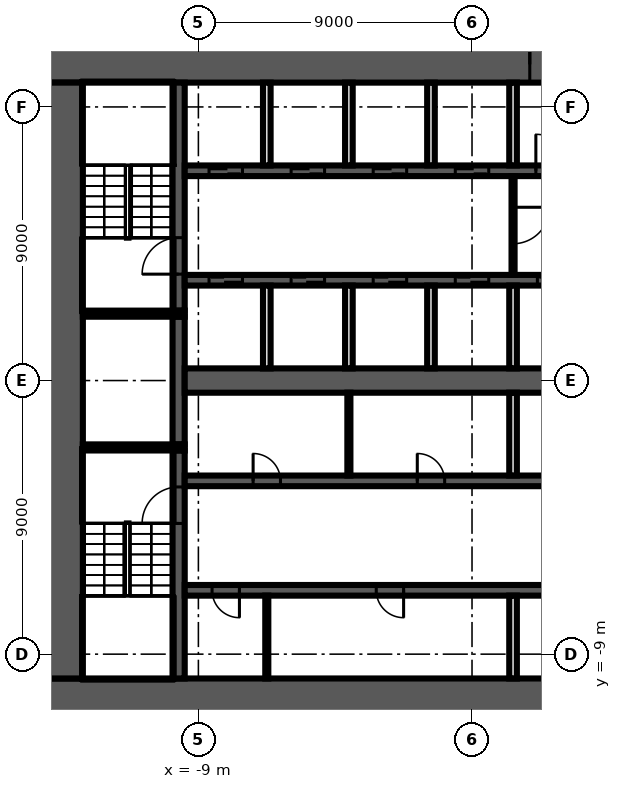
"""IFC4 building model, lengths in metres.
Left out: names, types, materials, properties, quantities, classifications, styles, units other than length and angle.
Written with IfcOpenShell. Run it as: python <this file> out.ifc"""

import sys

from ifc_helpers import new_model, si_unit, direction, frame, frame_2d, origin, place, context, subcontext, project, spatial, rectangle, extrude, element, fill, save


model = new_model("IFC4")
c1 = context("Model", 3, precision=1e-05, world=origin(), true_north=direction((0.0, 1.0)))
c2 = subcontext(c1, "Body", "Model", "MODEL_VIEW")
j1 = project(units=[si_unit("LENGTHUNIT", "METRE"), si_unit("PLANEANGLEUNIT", "RADIAN")], contexts=[c1])
p1 = place(None, origin())
s1 = spatial("IfcSite", under=j1, at=p1, CompositionType="ELEMENT")
p2 = place(p1, origin())
s2 = spatial("IfcBuilding", under=s1, at=p2, CompositionType="ELEMENT")
p3 = place(p2, frame((0.0, 0.0, 19.0)))
s3 = spatial("IfcBuildingStorey", under=s2, at=p3, CompositionType="ELEMENT", Elevation=19.0)
p4 = place(p3, frame((-14.0, 10.4, 0.0), z_axis=(0.0, 0.0, 1.0), x_axis=(1.0, 0.0, 0.0)))
e1 = element("IfcWall", 1, at=p4, inside=s3, PredefinedType="SHEAR", context=c2, shape_type="SweptSolid", body=[
    extrude(rectangle(XDim=28.0, YDim=1.2, at=frame_2d((14.0, 0.0))), origin(), (0.0, 0.0, 1.0), 7.55),
])
p5 = place(p4, frame((15.9, 0.0, 0.0)))
e2 = element("IfcOpeningElement", 2, at=p5, cuts=e1, PredefinedType="OPENING", context=c2, shape_type="SweptSolid", body=[
    extrude(rectangle(XDim=1.6, YDim=2.1, at=frame_2d((0.8, 1.05))), frame((0.0, 0.61, 0.0), z_axis=(0.0, -1.0, 0.0), x_axis=(1.0, 0.0, 0.0)), (0.0, 0.0, 1.0), 1.22),
])
p6 = place(p3, frame((14.0, -10.4, 0.0), z_axis=(0.0, 0.0, 1.0), x_axis=(-1.0, 0.0, 0.0)))
e3 = element("IfcWall", 3, at=p6, inside=s3, PredefinedType="SHEAR", context=c2, shape_type="SweptSolid", body=[
    extrude(rectangle(XDim=28.0, YDim=1.2, at=frame_2d((14.0, 0.0))), origin(), (0.0, 0.0, 1.0), 7.55),
])
p7 = place(p6, frame((5.1, 0.0, 0.0)))
e4 = element("IfcOpeningElement", 4, at=p7, cuts=e3, PredefinedType="OPENING", context=c2, shape_type="SweptSolid", body=[
    extrude(rectangle(XDim=1.6, YDim=2.1, at=frame_2d((0.8, 1.05))), frame((0.0, 0.61, 0.0), z_axis=(0.0, -1.0, 0.0), x_axis=(1.0, 0.0, 0.0)), (0.0, 0.0, 1.0), 1.22),
])
p8 = place(p3, frame((-13.4, -9.8, 0.0), z_axis=(0.0, 0.0, 1.0), x_axis=(0.0, 1.0, 0.0)))
e5 = element("IfcWall", 5, at=p8, inside=s3, PredefinedType="SHEAR", context=c2, shape_type="SweptSolid", body=[
    extrude(rectangle(XDim=19.6, YDim=1.2, at=frame_2d((9.8, 0.0))), origin(), (0.0, 0.0, 1.0), 7.55),
])
p9 = place(p3, frame((-9.65, -9.8, 0.0), z_axis=(0.0, 0.0, 1.0), x_axis=(0.0, 1.0, 0.0)))
e6 = element("IfcWall", 6, at=p9, inside=s3, PredefinedType="SHEAR", context=c2, shape_type="SweptSolid", body=[
    extrude(rectangle(XDim=7.5, YDim=0.4, at=frame_2d((3.75, 0.0))), origin(), (0.0, 0.0, 1.0), 7.55),
])
p10 = place(p9, frame((5.1, 0.0, 0.0)))
e7 = element("IfcOpeningElement", 7, at=p10, cuts=e6, PredefinedType="OPENING", context=c2, shape_type="SweptSolid", body=[
    extrude(rectangle(XDim=1.2, YDim=2.1, at=frame_2d((0.6, 1.05))), frame((0.0, 0.21, 0.0), z_axis=(0.0, -1.0, 0.0), x_axis=(1.0, 0.0, 0.0)), (0.0, 0.0, 1.0), 0.42),
])
p11 = place(p3, frame((-9.65, -2.1, 0.0), z_axis=(0.0, 0.0, 1.0), x_axis=(0.0, 1.0, 0.0)))
e8 = element("IfcWall", 8, at=p11, inside=s3, PredefinedType="SHEAR", context=c2, shape_type="SweptSolid", body=[
    extrude(rectangle(XDim=4.2, YDim=0.4, at=frame_2d((2.1, 0.0))), origin(), (0.0, 0.0, 1.0), 7.55),
])
p12 = place(p3, frame((-9.65, 2.3, 0.0), z_axis=(0.0, 0.0, 1.0), x_axis=(0.0, 1.0, 0.0)))
e9 = element("IfcWall", 9, at=p12, inside=s3, PredefinedType="SHEAR", context=c2, shape_type="SweptSolid", body=[
    extrude(rectangle(XDim=7.5, YDim=0.4, at=frame_2d((3.75, 0.0))), origin(), (0.0, 0.0, 1.0), 7.55),
])
p13 = place(p12, frame((1.2, 0.0, 0.0)))
e10 = element("IfcOpeningElement", 10, at=p13, cuts=e9, PredefinedType="OPENING", context=c2, shape_type="SweptSolid", body=[
    extrude(rectangle(XDim=1.2, YDim=2.1, at=frame_2d((0.6, 1.05))), frame((0.0, 0.21, 0.0), z_axis=(0.0, -1.0, 0.0), x_axis=(1.0, 0.0, 0.0)), (0.0, 0.0, 1.0), 0.42),
])
for number, where, z_axis, x_axis in (
    (11, (-9.45, 2.2, 0.0), (0.0, 0.0, 1.0), (-1.0, 0.0, 0.0)),
    (12, (-9.45, -2.2, 0.0), (0.0, 0.0, 1.0), (-1.0, 0.0, 0.0)),
):
    element("IfcWall", number, at=place(p3, frame(where, z_axis=z_axis, x_axis=x_axis)), inside=s3, PredefinedType="SHEAR", context=c2, shape_type="SweptSolid", body=[
        extrude(rectangle(XDim=3.35, YDim=0.2, at=frame_2d((1.675, 0.0))), origin(), (0.0, 0.0, 1.0), 7.55),
    ])
p14 = place(p3, frame((-9.45, 6.9, 0.0), z_axis=(0.0, 0.0, 1.0), x_axis=(1.0, 0.0, 0.0)))
e13 = element("IfcWall", 13, at=p14, inside=s3, PredefinedType="SHEAR", context=c2, shape_type="SweptSolid", body=[
    extrude(rectangle(XDim=18.9, YDim=0.35, at=frame_2d((9.45, 0.0))), origin(), (0.0, 0.0, 1.0), 7.55),
])
p15 = place(p14, frame((0.8, 0.0, 0.0)))
e14 = element("IfcOpeningElement", 14, at=p15, cuts=e13, PredefinedType="OPENING", context=c2, shape_type="SweptSolid", body=[
    extrude(rectangle(XDim=1.1, YDim=2.1, at=frame_2d((0.55, 1.05))), frame((0.0, 0.185, 0.0), z_axis=(0.0, -1.0, 0.0), x_axis=(1.0, 0.0, 0.0)), (0.0, 0.0, 1.0), 0.37),
])
p16 = place(p14, frame((3.5, 0.0, 0.0)))
e15 = element("IfcOpeningElement", 15, at=p16, cuts=e13, PredefinedType="OPENING", context=c2, shape_type="SweptSolid", body=[
    extrude(rectangle(XDim=1.1, YDim=2.1, at=frame_2d((0.55, 1.05))), frame((0.0, 0.185, 0.0), z_axis=(0.0, -1.0, 0.0), x_axis=(1.0, 0.0, 0.0)), (0.0, 0.0, 1.0), 0.37),
])
p17 = place(p14, frame((6.2, 0.0, 0.0)))
e16 = element("IfcOpeningElement", 16, at=p17, cuts=e13, PredefinedType="OPENING", context=c2, shape_type="SweptSolid", body=[
    extrude(rectangle(XDim=1.1, YDim=2.1, at=frame_2d((0.55, 1.05))), frame((0.0, 0.185, 0.0), z_axis=(0.0, -1.0, 0.0), x_axis=(1.0, 0.0, 0.0)), (0.0, 0.0, 1.0), 0.37),
])
p18 = place(p14, frame((8.9, 0.0, 0.0)))
e17 = element("IfcOpeningElement", 17, at=p18, cuts=e13, PredefinedType="OPENING", context=c2, shape_type="SweptSolid", body=[
    extrude(rectangle(XDim=1.1, YDim=2.1, at=frame_2d((0.55, 1.05))), frame((0.0, 0.185, 0.0), z_axis=(0.0, -1.0, 0.0), x_axis=(1.0, 0.0, 0.0)), (0.0, 0.0, 1.0), 0.37),
])
p19 = place(p14, frame((11.55, 0.0, 0.0)))
e18 = element("IfcOpeningElement", 18, at=p19, cuts=e13, PredefinedType="OPENING", context=c2, shape_type="SweptSolid", body=[
    extrude(rectangle(XDim=1.2, YDim=2.1, at=frame_2d((0.6, 1.05))), frame((0.0, 0.185, 0.0), z_axis=(0.0, -1.0, 0.0), x_axis=(1.0, 0.0, 0.0)), (0.0, 0.0, 1.0), 0.37),
])
p20 = place(p14, frame((14.3, 0.0, 0.0)))
e19 = element("IfcOpeningElement", 19, at=p20, cuts=e13, PredefinedType="OPENING", context=c2, shape_type="SweptSolid", body=[
    extrude(rectangle(XDim=1.1, YDim=2.1, at=frame_2d((0.55, 1.05))), frame((0.0, 0.185, 0.0), z_axis=(0.0, -1.0, 0.0), x_axis=(1.0, 0.0, 0.0)), (0.0, 0.0, 1.0), 0.37),
])
p21 = place(p14, frame((17.0, 0.0, 0.0)))
e20 = element("IfcOpeningElement", 20, at=p21, cuts=e13, PredefinedType="OPENING", context=c2, shape_type="SweptSolid", body=[
    extrude(rectangle(XDim=1.1, YDim=2.1, at=frame_2d((0.55, 1.05))), frame((0.0, 0.185, 0.0), z_axis=(0.0, -1.0, 0.0), x_axis=(1.0, 0.0, 0.0)), (0.0, 0.0, 1.0), 0.37),
])
p22 = place(p3, frame((9.45, 3.3, 0.0), z_axis=(0.0, 0.0, 1.0), x_axis=(-1.0, 0.0, 0.0)))
e21 = element("IfcWall", 21, at=p22, inside=s3, PredefinedType="SHEAR", context=c2, shape_type="SweptSolid", body=[
    extrude(rectangle(XDim=18.9, YDim=0.35, at=frame_2d((9.45, 0.0))), origin(), (0.0, 0.0, 1.0), 7.55),
])
p23 = place(p22, frame((17.0, 0.0, 0.0)))
e22 = element("IfcOpeningElement", 22, at=p23, cuts=e21, PredefinedType="OPENING", context=c2, shape_type="SweptSolid", body=[
    extrude(rectangle(XDim=1.1, YDim=2.1, at=frame_2d((0.55, 1.05))), frame((0.0, 0.185, 0.0), z_axis=(0.0, -1.0, 0.0), x_axis=(1.0, 0.0, 0.0)), (0.0, 0.0, 1.0), 0.37),
])
p24 = place(p22, frame((14.3, 0.0, 0.0)))
e23 = element("IfcOpeningElement", 23, at=p24, cuts=e21, PredefinedType="OPENING", context=c2, shape_type="SweptSolid", body=[
    extrude(rectangle(XDim=1.1, YDim=2.1, at=frame_2d((0.55, 1.05))), frame((0.0, 0.185, 0.0), z_axis=(0.0, -1.0, 0.0), x_axis=(1.0, 0.0, 0.0)), (0.0, 0.0, 1.0), 0.37),
])
p25 = place(p22, frame((11.6, 0.0, 0.0)))
e24 = element("IfcOpeningElement", 24, at=p25, cuts=e21, PredefinedType="OPENING", context=c2, shape_type="SweptSolid", body=[
    extrude(rectangle(XDim=1.1, YDim=2.1, at=frame_2d((0.55, 1.05))), frame((0.0, 0.185, 0.0), z_axis=(0.0, -1.0, 0.0), x_axis=(1.0, 0.0, 0.0)), (0.0, 0.0, 1.0), 0.37),
])
p26 = place(p22, frame((8.9, 0.0, 0.0)))
e25 = element("IfcOpeningElement", 25, at=p26, cuts=e21, PredefinedType="OPENING", context=c2, shape_type="SweptSolid", body=[
    extrude(rectangle(XDim=1.1, YDim=2.1, at=frame_2d((0.55, 1.05))), frame((0.0, 0.185, 0.0), z_axis=(0.0, -1.0, 0.0), x_axis=(1.0, 0.0, 0.0)), (0.0, 0.0, 1.0), 0.37),
])
p27 = place(p22, frame((6.2, 0.0, 0.0)))
e26 = element("IfcOpeningElement", 26, at=p27, cuts=e21, PredefinedType="OPENING", context=c2, shape_type="SweptSolid", body=[
    extrude(rectangle(XDim=1.1, YDim=2.1, at=frame_2d((0.55, 1.05))), frame((0.0, 0.185, 0.0), z_axis=(0.0, -1.0, 0.0), x_axis=(1.0, 0.0, 0.0)), (0.0, 0.0, 1.0), 0.37),
])
p28 = place(p22, frame((3.5, 0.0, 0.0)))
e27 = element("IfcOpeningElement", 27, at=p28, cuts=e21, PredefinedType="OPENING", context=c2, shape_type="SweptSolid", body=[
    extrude(rectangle(XDim=1.1, YDim=2.1, at=frame_2d((0.55, 1.05))), frame((0.0, 0.185, 0.0), z_axis=(0.0, -1.0, 0.0), x_axis=(1.0, 0.0, 0.0)), (0.0, 0.0, 1.0), 0.37),
])
p29 = place(p22, frame((0.9, 0.0, 0.0)))
e28 = element("IfcOpeningElement", 28, at=p29, cuts=e21, PredefinedType="OPENING", context=c2, shape_type="SweptSolid", body=[
    extrude(rectangle(XDim=0.9, YDim=2.1, at=frame_2d((0.45, 1.05))), frame((0.0, 0.185, 0.0), z_axis=(0.0, -1.0, 0.0), x_axis=(1.0, 0.0, 0.0)), (0.0, 0.0, 1.0), 0.37),
])
p30 = place(p3, frame((-9.45, -3.3, 0.0), z_axis=(0.0, 0.0, 1.0), x_axis=(1.0, 0.0, 0.0)))
e29 = element("IfcWall", 29, at=p30, inside=s3, PredefinedType="SHEAR", context=c2, shape_type="SweptSolid", body=[
    extrude(rectangle(XDim=18.9, YDim=0.35, at=frame_2d((9.45, 0.0))), origin(), (0.0, 0.0, 1.0), 7.55),
])
p31 = place(p30, frame((17.0, 0.0, 0.0)))
e30 = element("IfcOpeningElement", 30, at=p31, cuts=e29, PredefinedType="OPENING", context=c2, shape_type="SweptSolid", body=[
    extrude(rectangle(XDim=1.1, YDim=2.1, at=frame_2d((0.55, 1.05))), frame((0.0, 0.185, 0.0), z_axis=(0.0, -1.0, 0.0), x_axis=(1.0, 0.0, 0.0)), (0.0, 0.0, 1.0), 0.37),
])
p32 = place(p30, frame((2.25, 0.0, 0.0)))
e31 = element("IfcOpeningElement", 31, at=p32, cuts=e29, PredefinedType="OPENING", context=c2, shape_type="SweptSolid", body=[
    extrude(rectangle(XDim=0.9, YDim=2.1, at=frame_2d((0.45, 1.05))), frame((0.0, 0.185, 0.0), z_axis=(0.0, -1.0, 0.0), x_axis=(1.0, 0.0, 0.0)), (0.0, 0.0, 1.0), 0.37),
])
p33 = place(p30, frame((7.65, 0.0, 0.0)))
e32 = element("IfcOpeningElement", 32, at=p33, cuts=e29, PredefinedType="OPENING", context=c2, shape_type="SweptSolid", body=[
    extrude(rectangle(XDim=0.9, YDim=2.1, at=frame_2d((0.45, 1.05))), frame((0.0, 0.185, 0.0), z_axis=(0.0, -1.0, 0.0), x_axis=(1.0, 0.0, 0.0)), (0.0, 0.0, 1.0), 0.37),
])
p34 = place(p3, frame((9.45, -6.9, 0.0), z_axis=(0.0, 0.0, 1.0), x_axis=(-1.0, 0.0, 0.0)))
e33 = element("IfcWall", 33, at=p34, inside=s3, PredefinedType="SHEAR", context=c2, shape_type="SweptSolid", body=[
    extrude(rectangle(XDim=18.9, YDim=0.35, at=frame_2d((9.45, 0.0))), origin(), (0.0, 0.0, 1.0), 7.55),
])
p35 = place(p34, frame((0.75, 0.0, 0.0)))
e34 = element("IfcOpeningElement", 34, at=p35, cuts=e33, PredefinedType="OPENING", context=c2, shape_type="SweptSolid", body=[
    extrude(rectangle(XDim=1.2, YDim=2.1, at=frame_2d((0.6, 1.05))), frame((0.0, 0.185, 0.0), z_axis=(0.0, -1.0, 0.0), x_axis=(1.0, 0.0, 0.0)), (0.0, 0.0, 1.0), 0.37),
])
p36 = place(p34, frame((17.1, 0.0, 0.0)))
e35 = element("IfcOpeningElement", 35, at=p36, cuts=e33, PredefinedType="OPENING", context=c2, shape_type="SweptSolid", body=[
    extrude(rectangle(XDim=0.9, YDim=2.1, at=frame_2d((0.45, 1.05))), frame((0.0, 0.185, 0.0), z_axis=(0.0, -1.0, 0.0), x_axis=(1.0, 0.0, 0.0)), (0.0, 0.0, 1.0), 0.37),
])
p37 = place(p34, frame((11.7, 0.0, 0.0)))
e36 = element("IfcOpeningElement", 36, at=p37, cuts=e33, PredefinedType="OPENING", context=c2, shape_type="SweptSolid", body=[
    extrude(rectangle(XDim=0.9, YDim=2.1, at=frame_2d((0.45, 1.05))), frame((0.0, 0.185, 0.0), z_axis=(0.0, -1.0, 0.0), x_axis=(1.0, 0.0, 0.0)), (0.0, 0.0, 1.0), 0.37),
])
p38 = place(p3, frame((-9.45, 0.0, 0.0), z_axis=(0.0, 0.0, 1.0), x_axis=(1.0, 0.0, 0.0)))
e37 = element("IfcWall", 37, at=p38, inside=s3, PredefinedType="SHEAR", context=c2, shape_type="SweptSolid", body=[
    extrude(rectangle(XDim=18.9, YDim=0.8, at=frame_2d((9.45, 0.0))), origin(), (0.0, 0.0, 1.0), 7.55),
])
p39 = place(p3, frame((1.35, 6.725, 0.0), z_axis=(0.0, 0.0, 1.0), x_axis=(0.0, -1.0, 0.0)))
e38 = element("IfcWall", 38, at=p39, inside=s3, PredefinedType="PARTITIONING", context=c2, shape_type="SweptSolid", body=[
    extrude(rectangle(XDim=3.25, YDim=0.1, at=frame_2d((1.625, 0.0))), origin(), (0.0, 0.0, 1.0), 7.55),
])
p40 = place(p39, frame((1.025, 0.0, 0.0)))
e39 = element("IfcOpeningElement", 39, at=p40, cuts=e38, PredefinedType="OPENING", context=c2, shape_type="SweptSolid", body=[
    extrude(rectangle(XDim=1.2, YDim=2.1, at=frame_2d((0.6, 1.05))), frame((0.0, 0.06, 0.0), z_axis=(0.0, -1.0, 0.0), x_axis=(1.0, 0.0, 0.0)), (0.0, 0.0, 1.0), 0.12),
])
for number, where, z_axis, x_axis in (
    (40, (1.35, -9.8, 0.0), (0.0, 0.0, 1.0), (0.0, 1.0, 0.0)),
    (41, (1.35, -3.125, 0.0), (0.0, 0.0, 1.0), (0.0, 1.0, 0.0)),
    (42, (1.35, 0.4, 0.0), (0.0, 0.0, 1.0), (0.0, 1.0, 0.0)),
    (43, (1.35, 7.075, 0.0), (0.0, 0.0, 1.0), (0.0, 1.0, 0.0)),
    (44, (-1.35, 0.4, 0.0), (0.0, 0.0, 1.0), (0.0, 1.0, 0.0)),
    (45, (-1.35, 7.075, 0.0), (0.0, 0.0, 1.0), (0.0, 1.0, 0.0)),
):
    element("IfcWall", number, at=place(p3, frame(where, z_axis=z_axis, x_axis=x_axis)), inside=s3, PredefinedType="SOLIDWALL", context=c2, shape_type="SweptSolid", body=[
        extrude(rectangle(XDim=2.725, YDim=0.25, at=frame_2d((1.363, 0.0))), origin(), (0.0, 0.0, 1.0), 7.55),
    ])
p41 = place(p3, frame((-4.05, -3.125, 0.0), z_axis=(0.0, 0.0, 1.0), x_axis=(0.0, 1.0, 0.0)))
e46 = element("IfcWall", 46, at=p41, inside=s3, PredefinedType="PARTITIONING", context=c2, shape_type="SweptSolid", body=[
    extrude(rectangle(XDim=2.725, YDim=0.1, at=frame_2d((1.363, 0.0))), origin(), (0.0, 0.0, 1.0), 7.55),
])
for number, where, z_axis, x_axis in (
    (47, (-4.05, 0.4, 0.0), (0.0, 0.0, 1.0), (0.0, 1.0, 0.0)),
    (48, (-4.05, 7.075, 0.0), (0.0, 0.0, 1.0), (0.0, 1.0, 0.0)),
):
    element("IfcWall", number, at=place(p3, frame(where, z_axis=z_axis, x_axis=x_axis)), inside=s3, PredefinedType="SOLIDWALL", context=c2, shape_type="SweptSolid", body=[
        extrude(rectangle(XDim=2.725, YDim=0.25, at=frame_2d((1.363, 0.0))), origin(), (0.0, 0.0, 1.0), 7.55),
    ])
p42 = place(p3, frame((-6.75, -9.8, 0.0), z_axis=(0.0, 0.0, 1.0), x_axis=(0.0, 1.0, 0.0)))
e49 = element("IfcWall", 49, at=p42, inside=s3, PredefinedType="PARTITIONING", context=c2, shape_type="SweptSolid", body=[
    extrude(rectangle(XDim=2.725, YDim=0.1, at=frame_2d((1.363, 0.0))), origin(), (0.0, 0.0, 1.0), 7.55),
])
for number, where, z_axis, x_axis in (
    (50, (-6.75, 0.4, 0.0), (0.0, 0.0, 1.0), (0.0, 1.0, 0.0)),
    (51, (-6.75, 7.075, 0.0), (0.0, 0.0, 1.0), (0.0, 1.0, 0.0)),
):
    element("IfcWall", number, at=place(p3, frame(where, z_axis=z_axis, x_axis=x_axis)), inside=s3, PredefinedType="SOLIDWALL", context=c2, shape_type="SweptSolid", body=[
        extrude(rectangle(XDim=2.725, YDim=0.25, at=frame_2d((1.363, 0.0))), origin(), (0.0, 0.0, 1.0), 7.55),
    ])
p43 = place(p15, origin())
e52 = element("IfcDoor", 52, at=p43, inside=s3, OperationType="DOUBLE_DOOR_SLIDING", PredefinedType="DOOR", context=c2, shape_type="SweptSolid", body=[
    extrude(rectangle(XDim=1.1, YDim=2.1, at=frame_2d((0.55, 1.05))), frame((0.0, 0.025, 0.0), z_axis=(0.0, -1.0, 0.0), x_axis=(1.0, 0.0, 0.0)), (0.0, 0.0, 1.0), 0.05),
])
fill(e14, e52)
p44 = place(p16, origin())
e53 = element("IfcDoor", 53, at=p44, inside=s3, OperationType="DOUBLE_DOOR_SLIDING", PredefinedType="DOOR", context=c2, shape_type="SweptSolid", body=[
    extrude(rectangle(XDim=1.1, YDim=2.1, at=frame_2d((0.55, 1.05))), frame((0.0, 0.025, 0.0), z_axis=(0.0, -1.0, 0.0), x_axis=(1.0, 0.0, 0.0)), (0.0, 0.0, 1.0), 0.05),
])
fill(e15, e53)
p45 = place(p17, origin())
e54 = element("IfcDoor", 54, at=p45, inside=s3, OperationType="DOUBLE_DOOR_SLIDING", PredefinedType="DOOR", context=c2, shape_type="SweptSolid", body=[
    extrude(rectangle(XDim=1.1, YDim=2.1, at=frame_2d((0.55, 1.05))), frame((0.0, 0.025, 0.0), z_axis=(0.0, -1.0, 0.0), x_axis=(1.0, 0.0, 0.0)), (0.0, 0.0, 1.0), 0.05),
])
fill(e16, e54)
p46 = place(p18, origin())
e55 = element("IfcDoor", 55, at=p46, inside=s3, OperationType="DOUBLE_DOOR_SLIDING", PredefinedType="DOOR", context=c2, shape_type="SweptSolid", body=[
    extrude(rectangle(XDim=1.1, YDim=2.1, at=frame_2d((0.55, 1.05))), frame((0.0, 0.025, 0.0), z_axis=(0.0, -1.0, 0.0), x_axis=(1.0, 0.0, 0.0)), (0.0, 0.0, 1.0), 0.05),
])
fill(e17, e55)
p47 = place(p5, origin())
e56 = element("IfcDoor", 56, at=p47, inside=s3, OperationType="DOUBLE_DOOR_SINGLE_SWING", PredefinedType="DOOR", context=c2, shape_type="SweptSolid", body=[
    extrude(rectangle(XDim=1.6, YDim=2.1, at=frame_2d((0.8, 1.05))), frame((0.0, 0.025, 0.0), z_axis=(0.0, -1.0, 0.0), x_axis=(1.0, 0.0, 0.0)), (0.0, 0.0, 1.0), 0.05),
])
fill(e2, e56)
p48 = place(p19, origin())
e57 = element("IfcDoor", 57, at=p48, inside=s3, OperationType="SINGLE_SWING_LEFT", PredefinedType="DOOR", context=c2, shape_type="SweptSolid", body=[
    extrude(rectangle(XDim=1.2, YDim=2.1, at=frame_2d((0.6, 1.05))), frame((0.0, 0.025, 0.0), z_axis=(0.0, -1.0, 0.0), x_axis=(1.0, 0.0, 0.0)), (0.0, 0.0, 1.0), 0.05),
])
fill(e18, e57)
p49 = place(p23, origin())
e58 = element("IfcDoor", 58, at=p49, inside=s3, OperationType="DOUBLE_DOOR_SLIDING", PredefinedType="DOOR", context=c2, shape_type="SweptSolid", body=[
    extrude(rectangle(XDim=1.1, YDim=2.1, at=frame_2d((0.55, 1.05))), frame((0.0, 0.025, 0.0), z_axis=(0.0, -1.0, 0.0), x_axis=(1.0, 0.0, 0.0)), (0.0, 0.0, 1.0), 0.05),
])
fill(e22, e58)
p50 = place(p24, origin())
e59 = element("IfcDoor", 59, at=p50, inside=s3, OperationType="DOUBLE_DOOR_SLIDING", PredefinedType="DOOR", context=c2, shape_type="SweptSolid", body=[
    extrude(rectangle(XDim=1.1, YDim=2.1, at=frame_2d((0.55, 1.05))), frame((0.0, 0.025, 0.0), z_axis=(0.0, -1.0, 0.0), x_axis=(1.0, 0.0, 0.0)), (0.0, 0.0, 1.0), 0.05),
])
fill(e23, e59)
p51 = place(p25, origin())
e60 = element("IfcDoor", 60, at=p51, inside=s3, OperationType="DOUBLE_DOOR_SLIDING", PredefinedType="DOOR", context=c2, shape_type="SweptSolid", body=[
    extrude(rectangle(XDim=1.1, YDim=2.1, at=frame_2d((0.55, 1.05))), frame((0.0, 0.025, 0.0), z_axis=(0.0, -1.0, 0.0), x_axis=(1.0, 0.0, 0.0)), (0.0, 0.0, 1.0), 0.05),
])
fill(e24, e60)
p52 = place(p26, origin())
e61 = element("IfcDoor", 61, at=p52, inside=s3, OperationType="DOUBLE_DOOR_SLIDING", PredefinedType="DOOR", context=c2, shape_type="SweptSolid", body=[
    extrude(rectangle(XDim=1.1, YDim=2.1, at=frame_2d((0.55, 1.05))), frame((0.0, 0.025, 0.0), z_axis=(0.0, -1.0, 0.0), x_axis=(1.0, 0.0, 0.0)), (0.0, 0.0, 1.0), 0.05),
])
fill(e25, e61)
p53 = place(p27, origin())
e62 = element("IfcDoor", 62, at=p53, inside=s3, OperationType="DOUBLE_DOOR_SLIDING", PredefinedType="DOOR", context=c2, shape_type="SweptSolid", body=[
    extrude(rectangle(XDim=1.1, YDim=2.1, at=frame_2d((0.55, 1.05))), frame((0.0, 0.025, 0.0), z_axis=(0.0, -1.0, 0.0), x_axis=(1.0, 0.0, 0.0)), (0.0, 0.0, 1.0), 0.05),
])
fill(e26, e62)
p54 = place(p32, origin())
e63 = element("IfcDoor", 63, at=p54, inside=s3, OperationType="SINGLE_SWING_RIGHT", PredefinedType="DOOR", context=c2, shape_type="SweptSolid", body=[
    extrude(rectangle(XDim=0.9, YDim=2.1, at=frame_2d((0.45, 1.05))), frame((0.0, 0.025, 0.0), z_axis=(0.0, -1.0, 0.0), x_axis=(1.0, 0.0, 0.0)), (0.0, 0.0, 1.0), 0.05),
])
fill(e31, e63)
p55 = place(p33, origin())
e64 = element("IfcDoor", 64, at=p55, inside=s3, OperationType="SINGLE_SWING_LEFT", PredefinedType="DOOR", context=c2, shape_type="SweptSolid", body=[
    extrude(rectangle(XDim=0.9, YDim=2.1, at=frame_2d((0.45, 1.05))), frame((0.0, 0.025, 0.0), z_axis=(0.0, -1.0, 0.0), x_axis=(1.0, 0.0, 0.0)), (0.0, 0.0, 1.0), 0.05),
])
fill(e32, e64)
p56 = place(p36, origin())
e65 = element("IfcDoor", 65, at=p56, inside=s3, OperationType="SINGLE_SWING_RIGHT", PredefinedType="DOOR", context=c2, shape_type="SweptSolid", body=[
    extrude(rectangle(XDim=0.9, YDim=2.1, at=frame_2d((0.45, 1.05))), frame((0.0, 0.025, 0.0), z_axis=(0.0, -1.0, 0.0), x_axis=(1.0, 0.0, 0.0)), (0.0, 0.0, 1.0), 0.05),
])
fill(e35, e65)
p57 = place(p37, origin())
e66 = element("IfcDoor", 66, at=p57, inside=s3, OperationType="SINGLE_SWING_LEFT", PredefinedType="DOOR", context=c2, shape_type="SweptSolid", body=[
    extrude(rectangle(XDim=0.9, YDim=2.1, at=frame_2d((0.45, 1.05))), frame((0.0, 0.025, 0.0), z_axis=(0.0, -1.0, 0.0), x_axis=(1.0, 0.0, 0.0)), (0.0, 0.0, 1.0), 0.05),
])
fill(e36, e66)
p58 = place(p13, origin())
e67 = element("IfcDoor", 67, at=p58, inside=s3, OperationType="SINGLE_SWING_RIGHT", PredefinedType="DOOR", context=c2, shape_type="SweptSolid", body=[
    extrude(rectangle(XDim=1.2, YDim=2.1, at=frame_2d((0.6, 1.05))), frame((0.0, 0.025, 0.0), z_axis=(0.0, -1.0, 0.0), x_axis=(1.0, 0.0, 0.0)), (0.0, 0.0, 1.0), 0.05),
])
fill(e10, e67)
p59 = place(p10, origin())
e68 = element("IfcDoor", 68, at=p59, inside=s3, OperationType="SINGLE_SWING_LEFT", PredefinedType="DOOR", context=c2, shape_type="SweptSolid", body=[
    extrude(rectangle(XDim=1.2, YDim=2.1, at=frame_2d((0.6, 1.05))), frame((0.0, 0.025, 0.0), z_axis=(0.0, -1.0, 0.0), x_axis=(1.0, 0.0, 0.0)), (0.0, 0.0, 1.0), 0.05),
])
fill(e7, e68)
p60 = place(p40, origin())
e69 = element("IfcDoor", 69, at=p60, inside=s3, OperationType="SINGLE_SWING_LEFT", PredefinedType="DOOR", context=c2, shape_type="SweptSolid", body=[
    extrude(rectangle(XDim=1.2, YDim=2.1, at=frame_2d((0.6, 1.05))), frame((0.0, 0.025, 0.0), z_axis=(0.0, -1.0, 0.0), x_axis=(1.0, 0.0, 0.0)), (0.0, 0.0, 1.0), 0.05),
])
fill(e39, e69)
save(model, sys.argv[1])
